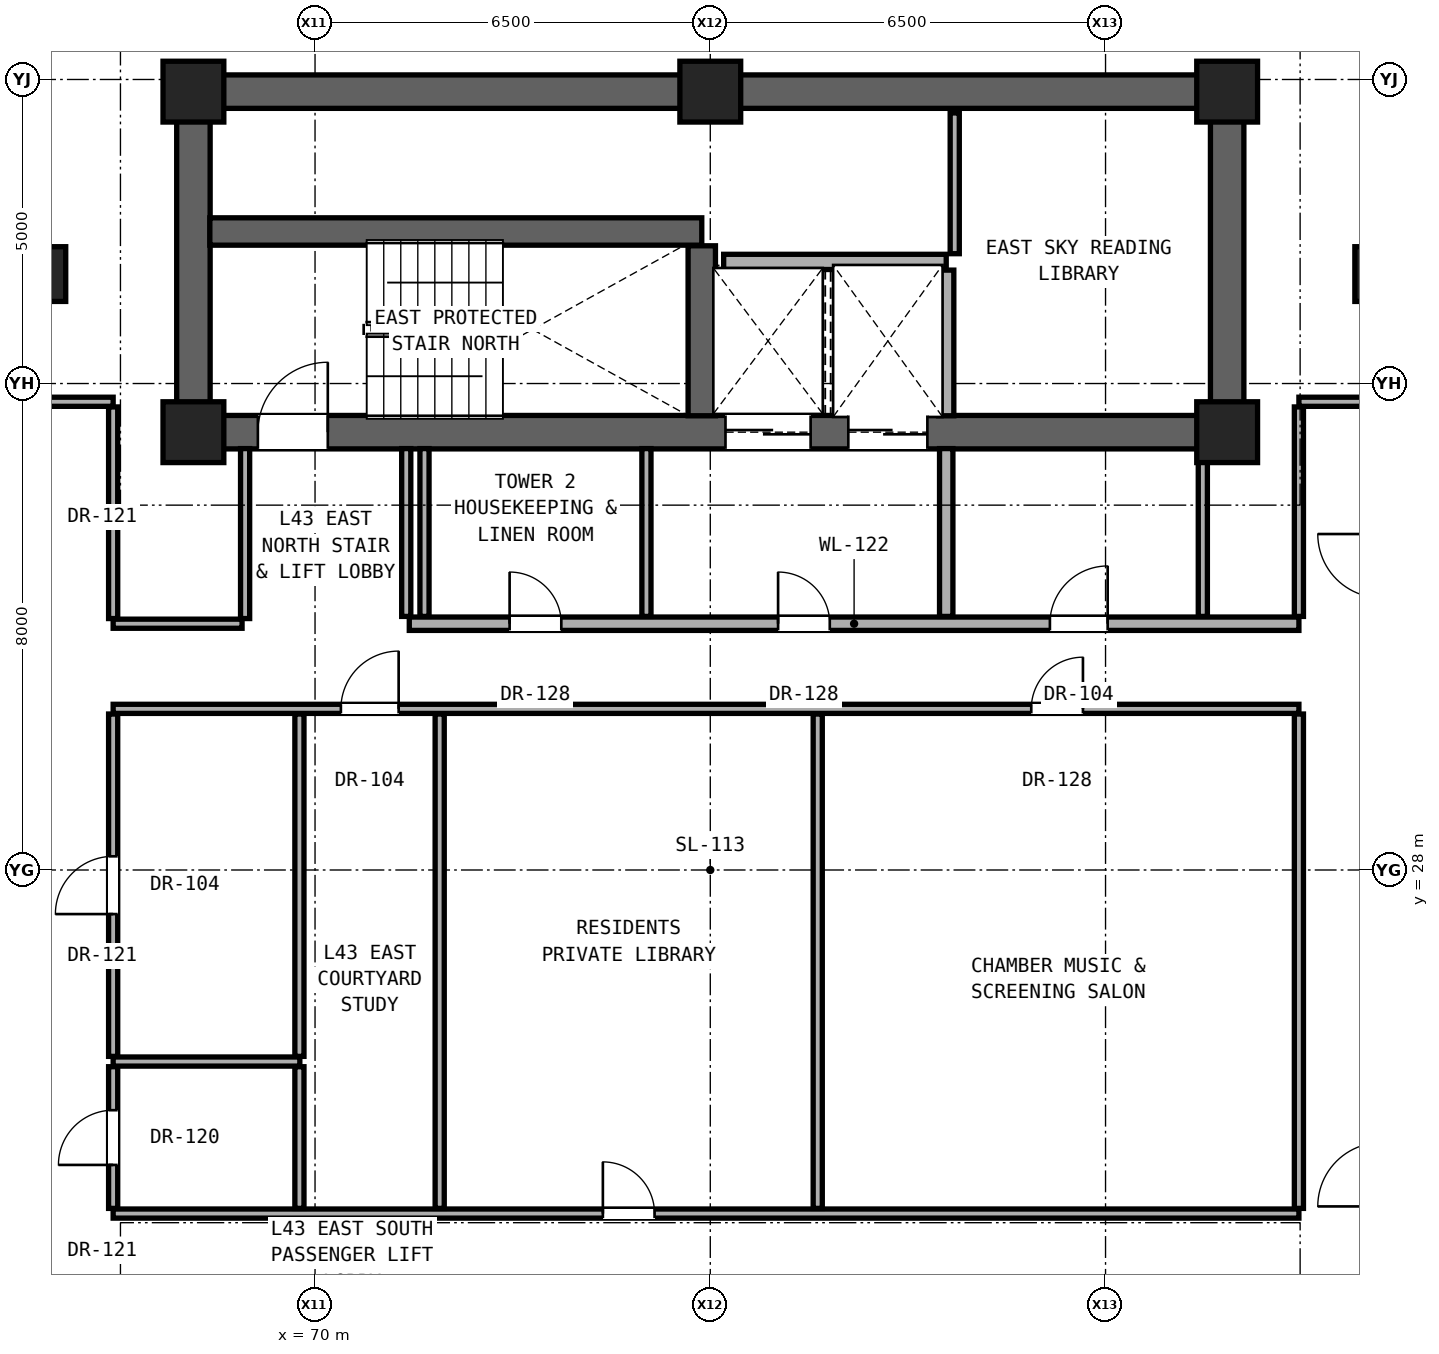
"""IFC4 building model, lengths in metres.
Left out: names, types, materials, properties, quantities, classifications, styles, units other than length and angle.
Written with IfcOpenShell. Run it as: python <this file> out.ifc"""

import sys

from ifc_helpers import new_model, si_unit, direction, frame, frame_2d, origin, origin_2d, place, context, subcontext, project, spatial, rectangle, extrude, element, fill, save


model = new_model("IFC4")
c1 = context("Model", 3, precision=1e-05, world=origin(), true_north=direction((0.0, 1.0)))
c2 = subcontext(c1, "Body", "Model", "MODEL_VIEW")
j1 = project(units=[si_unit("LENGTHUNIT", "METRE"), si_unit("PLANEANGLEUNIT", "RADIAN")], contexts=[c1])
p1 = place(None, origin())
s1 = spatial("IfcSite", under=j1, at=p1, CompositionType="ELEMENT")
p2 = place(p1, origin())
s2 = spatial("IfcBuilding", under=s1, at=p2, CompositionType="ELEMENT")
p3 = place(p2, frame((0.0, 0.0, 154.4)))
s3 = spatial("IfcBuildingStorey", under=s2, at=p3, CompositionType="ELEMENT", Elevation=154.4)
for number, where, z_axis, x_axis in (
    (1, (68.0, 35.2, 0.0), (0.0, 0.0, 1.0), (1.0, 0.0, 0.0)),
    (2, (85.0, 35.2, 0.0), (0.0, 0.0, 1.0), (1.0, 0.0, 0.0)),
    (3, (68.0, 40.8, 0.0), (0.0, 0.0, 1.0), (1.0, 0.0, 0.0)),
    (4, (76.5, 40.8, 0.0), (0.0, 0.0, 1.0), (1.0, 0.0, 0.0)),
    (5, (85.0, 40.8, 0.0), (0.0, 0.0, 1.0), (1.0, 0.0, 0.0)),
):
    element("IfcColumn", number, at=place(p3, frame(where, z_axis=z_axis, x_axis=x_axis)), inside=s3, PredefinedType="COLUMN", context=c2, shape_type="SweptSolid", body=[
        extrude(rectangle(XDim=1.0, YDim=1.0, at=origin_2d()), origin(), (0.0, 0.0, 1.0), 3.25),
    ])
for number, where, z_axis, x_axis in (
    (6, (65.6, 37.8, 0.0), (0.0, 0.0, 1.0), (1.0, 0.0, 0.0)),
    (7, (87.4, 37.8, 0.0), (0.0, 0.0, 1.0), (1.0, 0.0, 0.0)),
):
    element("IfcColumn", number, at=place(p3, frame(where, z_axis=z_axis, x_axis=x_axis)), inside=s3, PredefinedType="PILASTER", context=c2, shape_type="SweptSolid", body=[
        extrude(rectangle(XDim=0.6, YDim=0.9, at=origin_2d()), origin(), (0.0, 0.0, 1.0), 3.25),
    ])
p4 = place(p3, frame((68.0, 40.8, 0.0), z_axis=(0.0, 0.0, 1.0), x_axis=(1.0, 0.0, 0.0)))
e8 = element("IfcWall", 8, at=p4, inside=s3, PredefinedType="SHEAR", context=c2, shape_type="SweptSolid", body=[
    extrude(rectangle(XDim=17.0, YDim=0.55, at=frame_2d((8.5, 0.0))), origin(), (0.0, 0.0, 1.0), 3.05),
])
for number, where, z_axis, x_axis in (
    (9, (68.0, 35.2, 0.0), (0.0, 0.0, 1.0), (0.0, 1.0, 0.0)),
    (10, (85.0, 35.2, 0.0), (0.0, 0.0, 1.0), (0.0, 1.0, 0.0)),
):
    element("IfcWall", number, at=place(p3, frame(where, z_axis=z_axis, x_axis=x_axis)), inside=s3, PredefinedType="SHEAR", context=c2, shape_type="SweptSolid", body=[
        extrude(rectangle(XDim=5.6, YDim=0.55, at=frame_2d((2.8, 0.0))), origin(), (0.0, 0.0, 1.0), 3.05),
    ])
p5 = place(p3, frame((68.0, 35.2, 0.0), z_axis=(0.0, 0.0, 1.0), x_axis=(1.0, 0.0, 0.0)))
e11 = element("IfcWall", 11, at=p5, inside=s3, PredefinedType="SHEAR", context=c2, shape_type="SweptSolid", body=[
    extrude(rectangle(XDim=17.0, YDim=0.55, at=frame_2d((8.5, 0.0))), origin(), (0.0, 0.0, 1.0), 3.05),
])
p6 = place(p5, frame((1.06, 0.0, 0.0)))
e12 = element("IfcOpeningElement", 12, at=p6, cuts=e11, PredefinedType="OPENING", context=c2, shape_type="SweptSolid", body=[
    extrude(rectangle(XDim=1.15, YDim=2.2, at=frame_2d((0.575, 1.1))), frame((0.0, 0.285, 0.0), z_axis=(0.0, -1.0, 0.0), x_axis=(1.0, 0.0, 0.0)), (0.0, 0.0, 1.0), 0.57),
])
p7 = place(p5, frame((8.75, 0.0, 0.0)))
e13 = element("IfcOpeningElement", 13, at=p7, cuts=e11, PredefinedType="OPENING", context=c2, shape_type="SweptSolid", body=[
    extrude(rectangle(XDim=1.4, YDim=2.35, at=frame_2d((0.7, 1.175))), frame((0.0, 0.285, 0.0), z_axis=(0.0, -1.0, 0.0), x_axis=(1.0, 0.0, 0.0)), (0.0, 0.0, 1.0), 0.57),
])
p8 = place(p5, frame((10.77, 0.0, 0.0)))
e14 = element("IfcOpeningElement", 14, at=p8, cuts=e11, PredefinedType="OPENING", context=c2, shape_type="SweptSolid", body=[
    extrude(rectangle(XDim=1.3, YDim=2.3, at=frame_2d((0.65, 1.15))), frame((0.0, 0.285, 0.0), z_axis=(0.0, -1.0, 0.0), x_axis=(1.0, 0.0, 0.0)), (0.0, 0.0, 1.0), 0.57),
])
p9 = place(p3, frame((66.68, 22.35, 0.0), z_axis=(0.0, 0.0, 1.0), x_axis=(1.0, 0.0, 0.0)))
e15 = element("IfcWall", 15, at=p9, inside=s3, PredefinedType="PARTITIONING", context=c2, shape_type="SweptSolid", body=[
    extrude(rectangle(XDim=19.5, YDim=0.15, at=frame_2d((9.75, 0.0))), origin(), (0.0, 0.0, 1.0), 2.186),
])
p10 = place(p9, frame((8.053, 0.0, 0.0)))
e16 = element("IfcOpeningElement", 16, at=p10, cuts=e15, PredefinedType="OPENING", context=c2, shape_type="SweptSolid", body=[
    extrude(rectangle(XDim=0.85, YDim=2.01, at=frame_2d((0.425, 1.005))), frame((0.0, 0.085, 0.0), z_axis=(0.0, -1.0, 0.0), x_axis=(1.0, 0.0, 0.0)), (0.0, 0.0, 1.0), 0.17),
])
p11 = place(p3, frame((66.68, 24.85, 0.0), z_axis=(0.0, 0.0, 1.0), x_axis=(1.0, 0.0, 0.0)))
e17 = element("IfcWall", 17, at=p11, inside=s3, PredefinedType="PARTITIONING", context=c2, shape_type="SweptSolid", body=[
    extrude(rectangle(XDim=3.07, YDim=0.15, at=frame_2d((1.535, 0.0))), origin(), (0.0, 0.0, 1.0), 2.186),
])
p12 = place(p3, frame((66.68, 30.65, 0.0), z_axis=(0.0, 0.0, 1.0), x_axis=(1.0, 0.0, 0.0)))
e18 = element("IfcWall", 18, at=p12, inside=s3, PredefinedType="PARTITIONING", context=c2, shape_type="SweptSolid", body=[
    extrude(rectangle(XDim=19.5, YDim=0.15, at=frame_2d((9.75, 0.0))), origin(), (0.0, 0.0, 1.0), 2.186),
])
p13 = place(p12, frame((3.745, 0.0, 0.0)))
e19 = element("IfcOpeningElement", 19, at=p13, cuts=e18, PredefinedType="OPENING", context=c2, shape_type="SweptSolid", body=[
    extrude(rectangle(XDim=0.95, YDim=2.15, at=frame_2d((0.475, 1.075))), frame((0.0, 0.085, 0.0), z_axis=(0.0, -1.0, 0.0), x_axis=(1.0, 0.0, 0.0)), (0.0, 0.0, 1.0), 0.17),
])
p14 = place(p12, frame((15.098, 0.0, 0.0)))
e20 = element("IfcOpeningElement", 20, at=p14, cuts=e18, PredefinedType="OPENING", context=c2, shape_type="SweptSolid", body=[
    extrude(rectangle(XDim=0.85, YDim=2.01, at=frame_2d((0.425, 1.005))), frame((0.0, 0.085, 0.0), z_axis=(0.0, -1.0, 0.0), x_axis=(1.0, 0.0, 0.0)), (0.0, 0.0, 1.0), 0.17),
])
p15 = place(p3, frame((66.68, 32.05, 0.0), z_axis=(0.0, 0.0, 1.0), x_axis=(1.0, 0.0, 0.0)))
e21 = element("IfcWall", 21, at=p15, inside=s3, PredefinedType="PARTITIONING", context=c2, shape_type="SweptSolid", body=[
    extrude(rectangle(XDim=2.12, YDim=0.15, at=frame_2d((1.06, 0.0))), origin(), (0.0, 0.0, 1.0), 2.186),
])
p16 = place(p3, frame((71.55, 32.05, 0.0), z_axis=(0.0, 0.0, 1.0), x_axis=(1.0, 0.0, 0.0)))
e22 = element("IfcWall", 22, at=p16, inside=s3, PredefinedType="SOLIDWALL", context=c2, shape_type="SweptSolid", body=[
    extrude(rectangle(XDim=14.63, YDim=0.22, at=frame_2d((7.315, 0.0))), origin(), (0.0, 0.0, 1.0), 2.186),
])
p17 = place(p16, frame((6.065, 0.0, 0.0)))
e23 = element("IfcOpeningElement", 23, at=p17, cuts=e22, PredefinedType="OPENING", context=c2, shape_type="SweptSolid", body=[
    extrude(rectangle(XDim=0.85, YDim=2.01, at=frame_2d((0.425, 1.005))), frame((0.0, 0.12, 0.0), z_axis=(0.0, -1.0, 0.0), x_axis=(1.0, 0.0, 0.0)), (0.0, 0.0, 1.0), 0.24),
])
p18 = place(p16, frame((10.535, 0.0, 0.0)))
e24 = element("IfcOpeningElement", 24, at=p18, cuts=e22, PredefinedType="OPENING", context=c2, shape_type="SweptSolid", body=[
    extrude(rectangle(XDim=0.95, YDim=2.15, at=frame_2d((0.475, 1.075))), frame((0.0, 0.12, 0.0), z_axis=(0.0, -1.0, 0.0), x_axis=(1.0, 0.0, 0.0)), (0.0, 0.0, 1.0), 0.24),
])
p19 = place(p16, frame((1.65, 0.0, 0.0)))
e25 = element("IfcOpeningElement", 25, at=p19, cuts=e22, PredefinedType="OPENING", context=c2, shape_type="SweptSolid", body=[
    extrude(rectangle(XDim=0.85, YDim=2.01, at=frame_2d((0.425, 1.005))), frame((0.0, 0.12, 0.0), z_axis=(0.0, -1.0, 0.0), x_axis=(1.0, 0.0, 0.0)), (0.0, 0.0, 1.0), 0.24),
])
p20 = place(p3, frame((65.32, 35.7, 0.0), z_axis=(0.0, 0.0, 1.0), x_axis=(1.0, 0.0, 0.0)))
e26 = element("IfcWall", 26, at=p20, inside=s3, PredefinedType="PARTITIONING", context=c2, shape_type="SweptSolid", body=[
    extrude(rectangle(XDim=1.36, YDim=0.15, at=frame_2d((0.68, 0.0))), origin(), (0.0, 0.0, 1.0), 3.05),
])
p21 = place(p3, frame((86.18, 35.7, 0.0), z_axis=(0.0, 0.0, 1.0), x_axis=(1.0, 0.0, 0.0)))
e27 = element("IfcWall", 27, at=p21, inside=s3, PredefinedType="PARTITIONING", context=c2, shape_type="SweptSolid", body=[
    extrude(rectangle(XDim=1.36, YDim=0.15, at=frame_2d((0.68, 0.0))), origin(), (0.0, 0.0, 1.0), 3.05),
])
p22 = place(p3, frame((76.72, 38.0, 0.0), z_axis=(0.0, 0.0, 1.0), x_axis=(1.0, 0.0, 0.0)))
e28 = element("IfcWall", 28, at=p22, inside=s3, PredefinedType="SOLIDWALL", context=c2, shape_type="SweptSolid", body=[
    extrude(rectangle(XDim=3.66, YDim=0.25, at=frame_2d((1.83, 0.0))), origin(), (0.0, 0.0, 1.0), 3.05),
])
p23 = place(p3, frame((68.27, 38.5, 0.0), z_axis=(0.0, 0.0, 1.0), x_axis=(1.0, 0.0, 0.0)))
e29 = element("IfcWall", 29, at=p23, inside=s3, PredefinedType="SHEAR", context=c2, shape_type="SweptSolid", body=[
    extrude(rectangle(XDim=8.09, YDim=0.45, at=frame_2d((4.045, 0.0))), origin(), (0.0, 0.0, 1.0), 3.05),
])
p24 = place(p3, frame((66.68, 22.435, 0.0), z_axis=(0.0, 0.0, 1.0), x_axis=(0.0, 1.0, 0.0)))
e30 = element("IfcWall", 30, at=p24, inside=s3, PredefinedType="PARTITIONING", context=c2, shape_type="SweptSolid", body=[
    extrude(rectangle(XDim=2.33, YDim=0.15, at=frame_2d((1.165, 0.0))), origin(), (0.0, 0.0, 1.0), 3.05),
])
p25 = place(p24, frame((0.715, 0.0, 0.0)))
e31 = element("IfcOpeningElement", 31, at=p25, cuts=e30, PredefinedType="OPENING", context=c2, shape_type="SweptSolid", body=[
    extrude(rectangle(XDim=0.9, YDim=2.1, at=frame_2d((0.45, 1.05))), frame((0.0, 0.085, 0.0), z_axis=(0.0, -1.0, 0.0), x_axis=(1.0, 0.0, 0.0)), (0.0, 0.0, 1.0), 0.17),
])
p26 = place(p3, frame((66.68, 24.935, 0.0), z_axis=(0.0, 0.0, 1.0), x_axis=(0.0, 1.0, 0.0)))
e32 = element("IfcWall", 32, at=p26, inside=s3, PredefinedType="PARTITIONING", context=c2, shape_type="SweptSolid", body=[
    extrude(rectangle(XDim=5.63, YDim=0.15, at=frame_2d((2.815, 0.0))), origin(), (0.0, 0.0, 1.0), 2.346),
])
p27 = place(p26, frame((2.34, 0.0, 0.0)))
e33 = element("IfcOpeningElement", 33, at=p27, cuts=e32, PredefinedType="OPENING", context=c2, shape_type="SweptSolid", body=[
    extrude(rectangle(XDim=0.95, YDim=2.15, at=frame_2d((0.475, 1.075))), frame((0.0, 0.085, 0.0), z_axis=(0.0, -1.0, 0.0), x_axis=(1.0, 0.0, 0.0)), (0.0, 0.0, 1.0), 0.17),
])
p28 = place(p3, frame((66.68, 32.135, 0.0), z_axis=(0.0, 0.0, 1.0), x_axis=(0.0, 1.0, 0.0)))
e34 = element("IfcWall", 34, at=p28, inside=s3, PredefinedType="PARTITIONING", context=c2, shape_type="SweptSolid", body=[
    extrude(rectangle(XDim=3.48, YDim=0.15, at=frame_2d((1.74, 0.0))), origin(), (0.0, 0.0, 1.0), 2.442),
])
p29 = place(p3, frame((68.85, 32.135, 0.0), z_axis=(0.0, 0.0, 1.0), x_axis=(0.0, 1.0, 0.0)))
e35 = element("IfcWall", 35, at=p29, inside=s3, PredefinedType="PARTITIONING", context=c2, shape_type="SweptSolid", body=[
    extrude(rectangle(XDim=2.795, YDim=0.15, at=frame_2d((1.397, 0.0))), origin(), (0.0, 0.0, 1.0), 3.05),
])
p30 = place(p3, frame((69.743, 22.435, 0.0), z_axis=(0.0, 0.0, 1.0), x_axis=(0.0, 1.0, 0.0)))
e36 = element("IfcWall", 36, at=p30, inside=s3, PredefinedType="PARTITIONING", context=c2, shape_type="SweptSolid", body=[
    extrude(rectangle(XDim=2.33, YDim=0.15, at=frame_2d((1.165, 0.0))), origin(), (0.0, 0.0, 1.0), 3.05),
])
p31 = place(p3, frame((69.743, 24.935, 0.0), z_axis=(0.0, 0.0, 1.0), x_axis=(0.0, 1.0, 0.0)))
e37 = element("IfcWall", 37, at=p31, inside=s3, PredefinedType="PARTITIONING", context=c2, shape_type="SweptSolid", body=[
    extrude(rectangle(XDim=5.63, YDim=0.15, at=frame_2d((2.815, 0.0))), origin(), (0.0, 0.0, 1.0), 2.186),
])
for number, where, z_axis, x_axis in (
    (38, (71.5, 32.17, 0.0), (0.0, 0.0, 1.0), (0.0, 1.0, 0.0)),
    (39, (71.8, 32.17, 0.0), (0.0, 0.0, 1.0), (0.0, 1.0, 0.0)),
):
    element("IfcWall", number, at=place(p3, frame(where, z_axis=z_axis, x_axis=x_axis)), inside=s3, PredefinedType="PARTITIONING", context=c2, shape_type="SweptSolid", body=[
        extrude(rectangle(XDim=2.76, YDim=0.15, at=frame_2d((1.38, 0.0))), origin(), (0.0, 0.0, 1.0), 3.05),
    ])
p32 = place(p3, frame((72.05, 22.435, 0.0), z_axis=(0.0, 0.0, 1.0), x_axis=(0.0, 1.0, 0.0)))
e40 = element("IfcWall", 40, at=p32, inside=s3, PredefinedType="PARTITIONING", context=c2, shape_type="SweptSolid", body=[
    extrude(rectangle(XDim=8.13, YDim=0.15, at=frame_2d((4.065, 0.0))), origin(), (0.0, 0.0, 1.0), 2.186),
])
p33 = place(p3, frame((75.45, 32.17, 0.0), z_axis=(0.0, 0.0, 1.0), x_axis=(0.0, 1.0, 0.0)))
e41 = element("IfcWall", 41, at=p33, inside=s3, PredefinedType="PARTITIONING", context=c2, shape_type="SweptSolid", body=[
    extrude(rectangle(XDim=2.76, YDim=0.15, at=frame_2d((1.38, 0.0))), origin(), (0.0, 0.0, 1.0), 3.05),
])
p34 = place(p3, frame((76.36, 35.47, 0.0), z_axis=(0.0, 0.0, 1.0), x_axis=(0.0, 1.0, 0.0)))
e42 = element("IfcWall", 42, at=p34, inside=s3, PredefinedType="SHEAR", context=c2, shape_type="SweptSolid", body=[
    extrude(rectangle(XDim=2.795, YDim=0.45, at=frame_2d((1.397, 0.0))), origin(), (0.0, 0.0, 1.0), 3.05),
])
p35 = place(p3, frame((78.267, 22.435, 0.0), z_axis=(0.0, 0.0, 1.0), x_axis=(0.0, 1.0, 0.0)))
e43 = element("IfcWall", 43, at=p35, inside=s3, PredefinedType="PARTITIONING", context=c2, shape_type="SweptSolid", body=[
    extrude(rectangle(XDim=8.13, YDim=0.15, at=frame_2d((4.065, 0.0))), origin(), (0.0, 0.0, 1.0), 2.186),
])
p36 = place(p3, frame((80.38, 32.17, 0.0), z_axis=(0.0, 0.0, 1.0), x_axis=(0.0, 1.0, 0.0)))
e44 = element("IfcWall", 44, at=p36, inside=s3, PredefinedType="SOLIDWALL", context=c2, shape_type="SweptSolid", body=[
    extrude(rectangle(XDim=2.76, YDim=0.22, at=frame_2d((1.38, 0.0))), origin(), (0.0, 0.0, 1.0), 3.05),
])
p37 = place(p3, frame((80.38, 35.47, 0.0), z_axis=(0.0, 0.0, 1.0), x_axis=(0.0, 1.0, 0.0)))
e45 = element("IfcWall", 45, at=p37, inside=s3, PredefinedType="SOLIDWALL", context=c2, shape_type="SweptSolid", body=[
    extrude(rectangle(XDim=2.395, YDim=0.25, at=frame_2d((1.198, 0.0))), origin(), (0.0, 0.0, 1.0), 3.05),
])
p38 = place(p3, frame((80.52, 38.135, 0.0), z_axis=(0.0, 0.0, 1.0), x_axis=(0.0, 1.0, 0.0)))
e46 = element("IfcWall", 46, at=p38, inside=s3, PredefinedType="PARTITIONING", context=c2, shape_type="SweptSolid", body=[
    extrude(rectangle(XDim=2.315, YDim=0.15, at=frame_2d((1.157, 0.0))), origin(), (0.0, 0.0, 1.0), 3.05),
])
p39 = place(p3, frame((84.6, 32.17, 0.0), z_axis=(0.0, 0.0, 1.0), x_axis=(0.0, 1.0, 0.0)))
e47 = element("IfcWall", 47, at=p39, inside=s3, PredefinedType="PARTITIONING", context=c2, shape_type="SweptSolid", body=[
    extrude(rectangle(XDim=2.76, YDim=0.15, at=frame_2d((1.38, 0.0))), origin(), (0.0, 0.0, 1.0), 3.05),
])
p40 = place(p3, frame((86.18, 22.435, 0.0), z_axis=(0.0, 0.0, 1.0), x_axis=(0.0, 1.0, 0.0)))
e48 = element("IfcWall", 48, at=p40, inside=s3, PredefinedType="PARTITIONING", context=c2, shape_type="SweptSolid", body=[
    extrude(rectangle(XDim=8.13, YDim=0.15, at=frame_2d((4.065, 0.0))), origin(), (0.0, 0.0, 1.0), 2.346),
])
p41 = place(p3, frame((86.18, 32.17, 0.0), z_axis=(0.0, 0.0, 1.0), x_axis=(0.0, 1.0, 0.0)))
e49 = element("IfcWall", 49, at=p41, inside=s3, PredefinedType="PARTITIONING", context=c2, shape_type="SweptSolid", body=[
    extrude(rectangle(XDim=3.445, YDim=0.15, at=frame_2d((1.723, 0.0))), origin(), (0.0, 0.0, 1.0), 2.442),
])
p42 = place(p6, origin())
e50 = element("IfcDoor", 50, at=p42, inside=s3, OperationType="SINGLE_SWING_RIGHT", PredefinedType="DOOR", context=c2, shape_type="SweptSolid", body=[
    extrude(rectangle(XDim=1.15, YDim=2.2, at=frame_2d((0.575, 1.1))), frame((0.0, 0.025, 0.0), z_axis=(0.0, -1.0, 0.0), x_axis=(1.0, 0.0, 0.0)), (0.0, 0.0, 1.0), 0.05),
])
fill(e12, e50)
p43 = place(p17, origin())
e51 = element("IfcDoor", 51, at=p43, inside=s3, OperationType="SINGLE_SWING_LEFT", PredefinedType="DOOR", context=c2, shape_type="SweptSolid", body=[
    extrude(rectangle(XDim=0.85, YDim=2.01, at=frame_2d((0.425, 1.005))), frame((0.0, 0.025, 0.0), z_axis=(0.0, -1.0, 0.0), x_axis=(1.0, 0.0, 0.0)), (0.0, 0.0, 1.0), 0.05),
])
fill(e23, e51)
p44 = place(p18, origin())
e52 = element("IfcDoor", 52, at=p44, inside=s3, OperationType="SINGLE_SWING_RIGHT", PredefinedType="DOOR", context=c2, shape_type="SweptSolid", body=[
    extrude(rectangle(XDim=0.95, YDim=2.15, at=frame_2d((0.475, 1.075))), frame((0.0, 0.025, 0.0), z_axis=(0.0, -1.0, 0.0), x_axis=(1.0, 0.0, 0.0)), (0.0, 0.0, 1.0), 0.05),
])
fill(e24, e52)
p45 = place(p19, origin())
e53 = element("IfcDoor", 53, at=p45, inside=s3, OperationType="SINGLE_SWING_LEFT", PredefinedType="DOOR", context=c2, shape_type="SweptSolid", body=[
    extrude(rectangle(XDim=0.85, YDim=2.01, at=frame_2d((0.425, 1.005))), frame((0.0, 0.025, 0.0), z_axis=(0.0, -1.0, 0.0), x_axis=(1.0, 0.0, 0.0)), (0.0, 0.0, 1.0), 0.05),
])
fill(e25, e53)
p46 = place(p25, origin())
e54 = element("IfcDoor", 54, at=p46, inside=s3, OperationType="SINGLE_SWING_LEFT", PredefinedType="DOOR", context=c2, shape_type="SweptSolid", body=[
    extrude(rectangle(XDim=0.9, YDim=2.1, at=frame_2d((0.45, 1.05))), frame((0.0, 0.025, 0.0), z_axis=(0.0, -1.0, 0.0), x_axis=(1.0, 0.0, 0.0)), (0.0, 0.0, 1.0), 0.05),
])
fill(e31, e54)
p47 = place(p27, origin())
e55 = element("IfcDoor", 55, at=p47, inside=s3, OperationType="SINGLE_SWING_LEFT", PredefinedType="DOOR", context=c2, shape_type="SweptSolid", body=[
    extrude(rectangle(XDim=0.95, YDim=2.15, at=frame_2d((0.475, 1.075))), frame((0.0, 0.025, 0.0), z_axis=(0.0, -1.0, 0.0), x_axis=(1.0, 0.0, 0.0)), (0.0, 0.0, 1.0), 0.05),
])
fill(e33, e55)
p48 = place(p13, origin())
e56 = element("IfcDoor", 56, at=p48, inside=s3, OperationType="SINGLE_SWING_RIGHT", PredefinedType="DOOR", context=c2, shape_type="SweptSolid", body=[
    extrude(rectangle(XDim=0.95, YDim=2.15, at=frame_2d((0.475, 1.075))), frame((0.0, 0.025, 0.0), z_axis=(0.0, -1.0, 0.0), x_axis=(1.0, 0.0, 0.0)), (0.0, 0.0, 1.0), 0.05),
])
fill(e19, e56)
p49 = place(p10, origin())
e57 = element("IfcDoor", 57, at=p49, inside=s3, OperationType="SINGLE_SWING_LEFT", PredefinedType="DOOR", context=c2, shape_type="SweptSolid", body=[
    extrude(rectangle(XDim=0.85, YDim=2.01, at=frame_2d((0.425, 1.005))), frame((0.0, 0.025, 0.0), z_axis=(0.0, -1.0, 0.0), x_axis=(1.0, 0.0, 0.0)), (0.0, 0.0, 1.0), 0.05),
])
fill(e16, e57)
p50 = place(p14, origin())
e58 = element("IfcDoor", 58, at=p50, inside=s3, OperationType="SINGLE_SWING_RIGHT", PredefinedType="DOOR", context=c2, shape_type="SweptSolid", body=[
    extrude(rectangle(XDim=0.85, YDim=2.01, at=frame_2d((0.425, 1.005))), frame((0.0, 0.025, 0.0), z_axis=(0.0, -1.0, 0.0), x_axis=(1.0, 0.0, 0.0)), (0.0, 0.0, 1.0), 0.05),
])
fill(e20, e58)
p51 = place(p7, origin())
e59 = element("IfcDoor", 59, at=p51, inside=s3, OperationType="DOUBLE_DOOR_SLIDING", PredefinedType="DOOR", context=c2, shape_type="SweptSolid", body=[
    extrude(rectangle(XDim=1.4, YDim=2.35, at=frame_2d((0.7, 1.175))), frame((0.0, 0.025, 0.0), z_axis=(0.0, -1.0, 0.0), x_axis=(1.0, 0.0, 0.0)), (0.0, 0.0, 1.0), 0.05),
])
fill(e13, e59)
p52 = place(p8, origin())
e60 = element("IfcDoor", 60, at=p52, inside=s3, OperationType="DOUBLE_DOOR_SLIDING", PredefinedType="DOOR", context=c2, shape_type="SweptSolid", body=[
    extrude(rectangle(XDim=1.3, YDim=2.3, at=frame_2d((0.65, 1.15))), frame((0.0, 0.025, 0.0), z_axis=(0.0, -1.0, 0.0), x_axis=(1.0, 0.0, 0.0)), (0.0, 0.0, 1.0), 0.05),
])
fill(e14, e60)
save(model, sys.argv[1])
